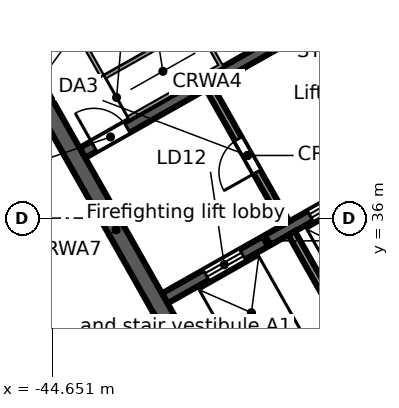
"""IFC4 building model, lengths in metres.
Left out: names, types, materials, properties, quantities, classifications, styles, units other than length and angle.
Written with IfcOpenShell. Run it as: python <this file> out.ifc"""

import sys

from ifc_helpers import new_model, si_unit, direction, frame, frame_2d, origin, place, context, subcontext, project, spatial, rectangle, extrude, element, fill, save


model = new_model("IFC4")
c1 = context("Model", 3, precision=1e-05, world=origin(), true_north=direction((0.0, 1.0)))
c2 = subcontext(c1, "Body", "Model", "MODEL_VIEW")
j1 = project(units=[si_unit("LENGTHUNIT", "METRE"), si_unit("PLANEANGLEUNIT", "RADIAN")], contexts=[c1])
p1 = place(None, origin())
s1 = spatial("IfcSite", under=j1, at=p1, CompositionType="ELEMENT")
p2 = place(p1, origin())
s2 = spatial("IfcBuilding", under=s1, at=p2, CompositionType="ELEMENT")
p3 = place(p2, frame((0.0, 0.0, 207.5)))
s3 = spatial("IfcBuildingStorey", under=s2, at=p3, CompositionType="ELEMENT", Elevation=207.5)
p4 = place(p3, frame((-0.046, 47.974, 0.0), z_axis=(0.0, 0.0, 1.0), x_axis=(-0.870356579543, -0.492421998337, 0.0)))
e1 = element("IfcWall", 1, at=p4, inside=s3, PredefinedType="STANDARD", context=c2, shape_type="SweptSolid", body=[
    extrude(rectangle(XDim=43.754, YDim=0.25, at=frame_2d((21.877, 0.0))), origin(), (0.0, 0.0, 1.0), 3.62),
])
p5 = place(p4, frame((41.061, 0.0, 0.8)))
e2 = element("IfcOpeningElement", 2, at=p5, cuts=e1, PredefinedType="OPENING", context=c2, shape_type="SweptSolid", body=[
    extrude(rectangle(XDim=2.4, YDim=2.2, at=frame_2d((1.2, 1.1))), frame((0.0, 0.135, 0.0), z_axis=(0.0, -1.0, 0.0), x_axis=(1.0, 0.0, 0.0)), (0.0, 0.0, 1.0), 0.27),
])
p6 = place(p4, frame((38.443, 0.0, 0.0)))
e3 = element("IfcOpeningElement", 3, at=p6, cuts=e1, PredefinedType="OPENING", context=c2, shape_type="SweptSolid", body=[
    extrude(rectangle(XDim=1.8, YDim=2.4, at=frame_2d((0.9, 1.2))), frame((0.0, 0.135, 0.0), z_axis=(0.0, -1.0, 0.0), x_axis=(1.0, 0.0, 0.0)), (0.0, 0.0, 1.0), 0.27),
])
p7 = place(p4, frame((35.225, 0.0, 0.8)))
e4 = element("IfcOpeningElement", 4, at=p7, cuts=e1, PredefinedType="OPENING", context=c2, shape_type="SweptSolid", body=[
    extrude(rectangle(XDim=2.4, YDim=2.2, at=frame_2d((1.2, 1.1))), frame((0.0, 0.135, 0.0), z_axis=(0.0, -1.0, 0.0), x_axis=(1.0, 0.0, 0.0)), (0.0, 0.0, 1.0), 0.27),
])
p8 = place(p4, frame((32.307, 0.0, 0.8)))
e5 = element("IfcOpeningElement", 5, at=p8, cuts=e1, PredefinedType="OPENING", context=c2, shape_type="SweptSolid", body=[
    extrude(rectangle(XDim=2.4, YDim=2.2, at=frame_2d((1.2, 1.1))), frame((0.0, 0.135, 0.0), z_axis=(0.0, -1.0, 0.0), x_axis=(1.0, 0.0, 0.0)), (0.0, 0.0, 1.0), 0.27),
])
p9 = place(p4, frame((29.688, 0.0, 0.0)))
e6 = element("IfcOpeningElement", 6, at=p9, cuts=e1, PredefinedType="OPENING", context=c2, shape_type="SweptSolid", body=[
    extrude(rectangle(XDim=1.8, YDim=2.4, at=frame_2d((0.9, 1.2))), frame((0.0, 0.135, 0.0), z_axis=(0.0, -1.0, 0.0), x_axis=(1.0, 0.0, 0.0)), (0.0, 0.0, 1.0), 0.27),
])
p10 = place(p4, frame((26.47, 0.0, 0.8)))
e7 = element("IfcOpeningElement", 7, at=p10, cuts=e1, PredefinedType="OPENING", context=c2, shape_type="SweptSolid", body=[
    extrude(rectangle(XDim=2.4, YDim=2.2, at=frame_2d((1.2, 1.1))), frame((0.0, 0.135, 0.0), z_axis=(0.0, -1.0, 0.0), x_axis=(1.0, 0.0, 0.0)), (0.0, 0.0, 1.0), 0.27),
])
p11 = place(p4, frame((23.552, 0.0, 0.8)))
e8 = element("IfcOpeningElement", 8, at=p11, cuts=e1, PredefinedType="OPENING", context=c2, shape_type="SweptSolid", body=[
    extrude(rectangle(XDim=2.4, YDim=2.2, at=frame_2d((1.2, 1.1))), frame((0.0, 0.135, 0.0), z_axis=(0.0, -1.0, 0.0), x_axis=(1.0, 0.0, 0.0)), (0.0, 0.0, 1.0), 0.27),
])
p12 = place(p4, frame((20.934, 0.0, 0.0)))
e9 = element("IfcOpeningElement", 9, at=p12, cuts=e1, PredefinedType="OPENING", context=c2, shape_type="SweptSolid", body=[
    extrude(rectangle(XDim=1.8, YDim=2.4, at=frame_2d((0.9, 1.2))), frame((0.0, 0.135, 0.0), z_axis=(0.0, -1.0, 0.0), x_axis=(1.0, 0.0, 0.0)), (0.0, 0.0, 1.0), 0.27),
])
p13 = place(p4, frame((17.716, 0.0, 0.8)))
e10 = element("IfcOpeningElement", 10, at=p13, cuts=e1, PredefinedType="OPENING", context=c2, shape_type="SweptSolid", body=[
    extrude(rectangle(XDim=2.4, YDim=2.2, at=frame_2d((1.2, 1.1))), frame((0.0, 0.135, 0.0), z_axis=(0.0, -1.0, 0.0), x_axis=(1.0, 0.0, 0.0)), (0.0, 0.0, 1.0), 0.27),
])
p14 = place(p4, frame((14.798, 0.0, 0.8)))
e11 = element("IfcOpeningElement", 11, at=p14, cuts=e1, PredefinedType="OPENING", context=c2, shape_type="SweptSolid", body=[
    extrude(rectangle(XDim=2.4, YDim=2.2, at=frame_2d((1.2, 1.1))), frame((0.0, 0.135, 0.0), z_axis=(0.0, -1.0, 0.0), x_axis=(1.0, 0.0, 0.0)), (0.0, 0.0, 1.0), 0.27),
])
p15 = place(p4, frame((12.179, 0.0, 0.0)))
e12 = element("IfcOpeningElement", 12, at=p15, cuts=e1, PredefinedType="OPENING", context=c2, shape_type="SweptSolid", body=[
    extrude(rectangle(XDim=1.8, YDim=2.4, at=frame_2d((0.9, 1.2))), frame((0.0, 0.135, 0.0), z_axis=(0.0, -1.0, 0.0), x_axis=(1.0, 0.0, 0.0)), (0.0, 0.0, 1.0), 0.27),
])
p16 = place(p4, frame((8.961, 0.0, 0.8)))
e13 = element("IfcOpeningElement", 13, at=p16, cuts=e1, PredefinedType="OPENING", context=c2, shape_type="SweptSolid", body=[
    extrude(rectangle(XDim=2.4, YDim=2.2, at=frame_2d((1.2, 1.1))), frame((0.0, 0.135, 0.0), z_axis=(0.0, -1.0, 0.0), x_axis=(1.0, 0.0, 0.0)), (0.0, 0.0, 1.0), 0.27),
])
p17 = place(p4, frame((6.043, 0.0, 0.8)))
e14 = element("IfcOpeningElement", 14, at=p17, cuts=e1, PredefinedType="OPENING", context=c2, shape_type="SweptSolid", body=[
    extrude(rectangle(XDim=2.4, YDim=2.2, at=frame_2d((1.2, 1.1))), frame((0.0, 0.135, 0.0), z_axis=(0.0, -1.0, 0.0), x_axis=(1.0, 0.0, 0.0)), (0.0, 0.0, 1.0), 0.27),
])
p18 = place(p4, frame((3.425, 0.0, 0.0)))
e15 = element("IfcOpeningElement", 15, at=p18, cuts=e1, PredefinedType="OPENING", context=c2, shape_type="SweptSolid", body=[
    extrude(rectangle(XDim=1.8, YDim=2.4, at=frame_2d((0.9, 1.2))), frame((0.0, 0.135, 0.0), z_axis=(0.0, -1.0, 0.0), x_axis=(1.0, 0.0, 0.0)), (0.0, 0.0, 1.0), 0.27),
])
p19 = place(p4, frame((0.207, 0.0, 0.8)))
e16 = element("IfcOpeningElement", 16, at=p19, cuts=e1, PredefinedType="OPENING", context=c2, shape_type="SweptSolid", body=[
    extrude(rectangle(XDim=2.4, YDim=2.2, at=frame_2d((1.2, 1.1))), frame((0.0, 0.135, 0.0), z_axis=(0.0, -1.0, 0.0), x_axis=(1.0, 0.0, 0.0)), (0.0, 0.0, 1.0), 0.27),
])
p20 = place(p3, frame((-58.732, 38.771, 0.0), z_axis=(0.0, 0.0, 1.0), x_axis=(0.870354824205, 0.492425100887, 0.0)))
e17 = element("IfcWall", 17, at=p20, inside=s3, PredefinedType="STANDARD", context=c2, shape_type="SweptSolid", body=[
    extrude(rectangle(XDim=64.006, YDim=0.25, at=frame_2d((32.003, 0.0))), origin(), (0.0, 0.0, 1.0), 3.62),
])
p21 = place(p20, frame((61.259, 0.0, 0.8)))
e18 = element("IfcOpeningElement", 18, at=p21, cuts=e17, PredefinedType="OPENING", context=c2, shape_type="SweptSolid", body=[
    extrude(rectangle(XDim=2.4, YDim=2.2, at=frame_2d((1.2, 1.1))), frame((0.0, 0.135, 0.0), z_axis=(0.0, -1.0, 0.0), x_axis=(1.0, 0.0, 0.0)), (0.0, 0.0, 1.0), 0.27),
])
p22 = place(p20, frame((58.216, 0.0, 0.8)))
e19 = element("IfcOpeningElement", 19, at=p22, cuts=e17, PredefinedType="OPENING", context=c2, shape_type="SweptSolid", body=[
    extrude(rectangle(XDim=2.4, YDim=2.2, at=frame_2d((1.2, 1.1))), frame((0.0, 0.135, 0.0), z_axis=(0.0, -1.0, 0.0), x_axis=(1.0, 0.0, 0.0)), (0.0, 0.0, 1.0), 0.27),
])
p23 = place(p20, frame((55.173, 0.0, 0.8)))
e20 = element("IfcOpeningElement", 20, at=p23, cuts=e17, PredefinedType="OPENING", context=c2, shape_type="SweptSolid", body=[
    extrude(rectangle(XDim=2.4, YDim=2.2, at=frame_2d((1.2, 1.1))), frame((0.0, 0.135, 0.0), z_axis=(0.0, -1.0, 0.0), x_axis=(1.0, 0.0, 0.0)), (0.0, 0.0, 1.0), 0.27),
])
p24 = place(p20, frame((52.129, 0.0, 0.8)))
e21 = element("IfcOpeningElement", 21, at=p24, cuts=e17, PredefinedType="OPENING", context=c2, shape_type="SweptSolid", body=[
    extrude(rectangle(XDim=2.4, YDim=2.2, at=frame_2d((1.2, 1.1))), frame((0.0, 0.135, 0.0), z_axis=(0.0, -1.0, 0.0), x_axis=(1.0, 0.0, 0.0)), (0.0, 0.0, 1.0), 0.27),
])
p25 = place(p20, frame((49.086, 0.0, 0.8)))
e22 = element("IfcOpeningElement", 22, at=p25, cuts=e17, PredefinedType="OPENING", context=c2, shape_type="SweptSolid", body=[
    extrude(rectangle(XDim=2.4, YDim=2.2, at=frame_2d((1.2, 1.1))), frame((0.0, 0.135, 0.0), z_axis=(0.0, -1.0, 0.0), x_axis=(1.0, 0.0, 0.0)), (0.0, 0.0, 1.0), 0.27),
])
p26 = place(p20, frame((46.043, 0.0, 0.8)))
e23 = element("IfcOpeningElement", 23, at=p26, cuts=e17, PredefinedType="OPENING", context=c2, shape_type="SweptSolid", body=[
    extrude(rectangle(XDim=2.4, YDim=2.2, at=frame_2d((1.2, 1.1))), frame((0.0, 0.135, 0.0), z_axis=(0.0, -1.0, 0.0), x_axis=(1.0, 0.0, 0.0)), (0.0, 0.0, 1.0), 0.27),
])
p27 = place(p20, frame((43.0, 0.0, 0.8)))
e24 = element("IfcOpeningElement", 24, at=p27, cuts=e17, PredefinedType="OPENING", context=c2, shape_type="SweptSolid", body=[
    extrude(rectangle(XDim=2.4, YDim=2.2, at=frame_2d((1.2, 1.1))), frame((0.0, 0.135, 0.0), z_axis=(0.0, -1.0, 0.0), x_axis=(1.0, 0.0, 0.0)), (0.0, 0.0, 1.0), 0.27),
])
p28 = place(p20, frame((39.956, 0.0, 0.8)))
e25 = element("IfcOpeningElement", 25, at=p28, cuts=e17, PredefinedType="OPENING", context=c2, shape_type="SweptSolid", body=[
    extrude(rectangle(XDim=2.4, YDim=2.2, at=frame_2d((1.2, 1.1))), frame((0.0, 0.135, 0.0), z_axis=(0.0, -1.0, 0.0), x_axis=(1.0, 0.0, 0.0)), (0.0, 0.0, 1.0), 0.27),
])
p29 = place(p20, frame((36.913, 0.0, 0.8)))
e26 = element("IfcOpeningElement", 26, at=p29, cuts=e17, PredefinedType="OPENING", context=c2, shape_type="SweptSolid", body=[
    extrude(rectangle(XDim=2.4, YDim=2.2, at=frame_2d((1.2, 1.1))), frame((0.0, 0.135, 0.0), z_axis=(0.0, -1.0, 0.0), x_axis=(1.0, 0.0, 0.0)), (0.0, 0.0, 1.0), 0.27),
])
p30 = place(p20, frame((33.87, 0.0, 0.8)))
e27 = element("IfcOpeningElement", 27, at=p30, cuts=e17, PredefinedType="OPENING", context=c2, shape_type="SweptSolid", body=[
    extrude(rectangle(XDim=2.4, YDim=2.2, at=frame_2d((1.2, 1.1))), frame((0.0, 0.135, 0.0), z_axis=(0.0, -1.0, 0.0), x_axis=(1.0, 0.0, 0.0)), (0.0, 0.0, 1.0), 0.27),
])
p31 = place(p20, frame((30.826, 0.0, 0.8)))
e28 = element("IfcOpeningElement", 28, at=p31, cuts=e17, PredefinedType="OPENING", context=c2, shape_type="SweptSolid", body=[
    extrude(rectangle(XDim=2.4, YDim=2.2, at=frame_2d((1.2, 1.1))), frame((0.0, 0.135, 0.0), z_axis=(0.0, -1.0, 0.0), x_axis=(1.0, 0.0, 0.0)), (0.0, 0.0, 1.0), 0.27),
])
p32 = place(p20, frame((27.783, 0.0, 0.8)))
e29 = element("IfcOpeningElement", 29, at=p32, cuts=e17, PredefinedType="OPENING", context=c2, shape_type="SweptSolid", body=[
    extrude(rectangle(XDim=2.4, YDim=2.2, at=frame_2d((1.2, 1.1))), frame((0.0, 0.135, 0.0), z_axis=(0.0, -1.0, 0.0), x_axis=(1.0, 0.0, 0.0)), (0.0, 0.0, 1.0), 0.27),
])
p33 = place(p20, frame((24.74, 0.0, 0.8)))
e30 = element("IfcOpeningElement", 30, at=p33, cuts=e17, PredefinedType="OPENING", context=c2, shape_type="SweptSolid", body=[
    extrude(rectangle(XDim=2.4, YDim=2.2, at=frame_2d((1.2, 1.1))), frame((0.0, 0.135, 0.0), z_axis=(0.0, -1.0, 0.0), x_axis=(1.0, 0.0, 0.0)), (0.0, 0.0, 1.0), 0.27),
])
p34 = place(p20, frame((21.696, 0.0, 0.8)))
e31 = element("IfcOpeningElement", 31, at=p34, cuts=e17, PredefinedType="OPENING", context=c2, shape_type="SweptSolid", body=[
    extrude(rectangle(XDim=2.4, YDim=2.2, at=frame_2d((1.2, 1.1))), frame((0.0, 0.135, 0.0), z_axis=(0.0, -1.0, 0.0), x_axis=(1.0, 0.0, 0.0)), (0.0, 0.0, 1.0), 0.27),
])
p35 = place(p20, frame((18.653, 0.0, 0.8)))
e32 = element("IfcOpeningElement", 32, at=p35, cuts=e17, PredefinedType="OPENING", context=c2, shape_type="SweptSolid", body=[
    extrude(rectangle(XDim=2.4, YDim=2.2, at=frame_2d((1.2, 1.1))), frame((0.0, 0.135, 0.0), z_axis=(0.0, -1.0, 0.0), x_axis=(1.0, 0.0, 0.0)), (0.0, 0.0, 1.0), 0.27),
])
p36 = place(p20, frame((15.61, 0.0, 0.8)))
e33 = element("IfcOpeningElement", 33, at=p36, cuts=e17, PredefinedType="OPENING", context=c2, shape_type="SweptSolid", body=[
    extrude(rectangle(XDim=2.4, YDim=2.2, at=frame_2d((1.2, 1.1))), frame((0.0, 0.135, 0.0), z_axis=(0.0, -1.0, 0.0), x_axis=(1.0, 0.0, 0.0)), (0.0, 0.0, 1.0), 0.27),
])
p37 = place(p20, frame((12.567, 0.0, 0.8)))
e34 = element("IfcOpeningElement", 34, at=p37, cuts=e17, PredefinedType="OPENING", context=c2, shape_type="SweptSolid", body=[
    extrude(rectangle(XDim=2.4, YDim=2.2, at=frame_2d((1.2, 1.1))), frame((0.0, 0.135, 0.0), z_axis=(0.0, -1.0, 0.0), x_axis=(1.0, 0.0, 0.0)), (0.0, 0.0, 1.0), 0.27),
])
p38 = place(p20, frame((9.523, 0.0, 0.8)))
e35 = element("IfcOpeningElement", 35, at=p38, cuts=e17, PredefinedType="OPENING", context=c2, shape_type="SweptSolid", body=[
    extrude(rectangle(XDim=2.4, YDim=2.2, at=frame_2d((1.2, 1.1))), frame((0.0, 0.135, 0.0), z_axis=(0.0, -1.0, 0.0), x_axis=(1.0, 0.0, 0.0)), (0.0, 0.0, 1.0), 0.27),
])
p39 = place(p20, frame((6.48, 0.0, 0.8)))
e36 = element("IfcOpeningElement", 36, at=p39, cuts=e17, PredefinedType="OPENING", context=c2, shape_type="SweptSolid", body=[
    extrude(rectangle(XDim=2.4, YDim=2.2, at=frame_2d((1.2, 1.1))), frame((0.0, 0.135, 0.0), z_axis=(0.0, -1.0, 0.0), x_axis=(1.0, 0.0, 0.0)), (0.0, 0.0, 1.0), 0.27),
])
p40 = place(p20, frame((3.437, 0.0, 0.8)))
e37 = element("IfcOpeningElement", 37, at=p40, cuts=e17, PredefinedType="OPENING", context=c2, shape_type="SweptSolid", body=[
    extrude(rectangle(XDim=2.4, YDim=2.2, at=frame_2d((1.2, 1.1))), frame((0.0, 0.135, 0.0), z_axis=(0.0, -1.0, 0.0), x_axis=(1.0, 0.0, 0.0)), (0.0, 0.0, 1.0), 0.27),
])
p41 = place(p20, frame((0.393, 0.0, 0.8)))
e38 = element("IfcOpeningElement", 38, at=p41, cuts=e17, PredefinedType="OPENING", context=c2, shape_type="SweptSolid", body=[
    extrude(rectangle(XDim=2.4, YDim=2.2, at=frame_2d((1.2, 1.1))), frame((0.0, 0.135, 0.0), z_axis=(0.0, -1.0, 0.0), x_axis=(1.0, 0.0, 0.0)), (0.0, 0.0, 1.0), 0.27),
])
p42 = place(p3, frame((-44.115, 26.507, 0.0), z_axis=(0.0, 0.0, 1.0), x_axis=(-0.857166583633, 0.515039268311, 0.0)))
e39 = element("IfcWall", 39, at=p42, inside=s3, PredefinedType="STANDARD", context=c2, shape_type="SweptSolid", body=[
    extrude(rectangle(XDim=17.106, YDim=0.25, at=frame_2d((8.553, 0.0))), origin(), (0.0, 0.0, 1.0), 3.62),
])
p43 = place(p42, frame((14.417, 0.0, 0.8)))
e40 = element("IfcOpeningElement", 40, at=p43, cuts=e39, PredefinedType="OPENING", context=c2, shape_type="SweptSolid", body=[
    extrude(rectangle(XDim=2.4, YDim=2.2, at=frame_2d((1.2, 1.1))), frame((0.0, 0.135, 0.0), z_axis=(0.0, -1.0, 0.0), x_axis=(1.0, 0.0, 0.0)), (0.0, 0.0, 1.0), 0.27),
])
p44 = place(p42, frame((11.584, 0.0, 0.8)))
e41 = element("IfcOpeningElement", 41, at=p44, cuts=e39, PredefinedType="OPENING", context=c2, shape_type="SweptSolid", body=[
    extrude(rectangle(XDim=2.4, YDim=2.2, at=frame_2d((1.2, 1.1))), frame((0.0, 0.135, 0.0), z_axis=(0.0, -1.0, 0.0), x_axis=(1.0, 0.0, 0.0)), (0.0, 0.0, 1.0), 0.27),
])
p45 = place(p42, frame((8.75, 0.0, 0.8)))
e42 = element("IfcOpeningElement", 42, at=p45, cuts=e39, PredefinedType="OPENING", context=c2, shape_type="SweptSolid", body=[
    extrude(rectangle(XDim=2.4, YDim=2.2, at=frame_2d((1.2, 1.1))), frame((0.0, 0.135, 0.0), z_axis=(0.0, -1.0, 0.0), x_axis=(1.0, 0.0, 0.0)), (0.0, 0.0, 1.0), 0.27),
])
p46 = place(p42, frame((5.917, 0.0, 0.8)))
e43 = element("IfcOpeningElement", 43, at=p46, cuts=e39, PredefinedType="OPENING", context=c2, shape_type="SweptSolid", body=[
    extrude(rectangle(XDim=2.4, YDim=2.2, at=frame_2d((1.2, 1.1))), frame((0.0, 0.135, 0.0), z_axis=(0.0, -1.0, 0.0), x_axis=(1.0, 0.0, 0.0)), (0.0, 0.0, 1.0), 0.27),
])
p47 = place(p42, frame((3.084, 0.0, 0.8)))
e44 = element("IfcOpeningElement", 44, at=p47, cuts=e39, PredefinedType="OPENING", context=c2, shape_type="SweptSolid", body=[
    extrude(rectangle(XDim=2.4, YDim=2.2, at=frame_2d((1.2, 1.1))), frame((0.0, 0.135, 0.0), z_axis=(0.0, -1.0, 0.0), x_axis=(1.0, 0.0, 0.0)), (0.0, 0.0, 1.0), 0.27),
])
p48 = place(p42, frame((0.25, 0.0, 0.8)))
e45 = element("IfcOpeningElement", 45, at=p48, cuts=e39, PredefinedType="OPENING", context=c2, shape_type="SweptSolid", body=[
    extrude(rectangle(XDim=2.4, YDim=2.2, at=frame_2d((1.2, 1.1))), frame((0.0, 0.135, 0.0), z_axis=(0.0, -1.0, 0.0), x_axis=(1.0, 0.0, 0.0)), (0.0, 0.0, 1.0), 0.27),
])
p49 = place(p3, frame((-39.825, 29.684, 0.0), z_axis=(0.0, 0.0, 1.0), x_axis=(0.870353598469, 0.492427267353, 0.0)))
e46 = element("IfcWall", 46, at=p49, inside=s3, PredefinedType="SOLIDWALL", context=c2, shape_type="SweptSolid", body=[
    extrude(rectangle(XDim=17.0, YDim=0.45, at=frame_2d((8.5, 0.0))), origin(), (0.0, 0.0, 1.0), 3.62),
])
p50 = place(p49, frame((7.2, 0.0, 0.0)))
e47 = element("IfcOpeningElement", 47, at=p50, cuts=e46, PredefinedType="OPENING", context=c2, shape_type="SweptSolid", body=[
    extrude(rectangle(XDim=1.2, YDim=2.1, at=frame_2d((0.6, 1.05))), frame((0.0, 0.235, 0.0), z_axis=(0.0, -1.0, 0.0), x_axis=(1.0, 0.0, 0.0)), (0.0, 0.0, 1.0), 0.47),
])
p51 = place(p3, frame((-41.687, 33.887, 0.0), z_axis=(0.0, 0.0, 1.0), x_axis=(0.870355736587, 0.49242348826, 0.0)))
e48 = element("IfcWall", 48, at=p51, inside=s3, PredefinedType="SOLIDWALL", context=c2, shape_type="SweptSolid", body=[
    extrude(rectangle(XDim=6.15, YDim=0.3, at=frame_2d((3.075, 0.0))), origin(), (0.0, 0.0, 1.0), 3.62),
])
p52 = place(p51, frame((1.25, 0.0, 0.0)))
e49 = element("IfcOpeningElement", 49, at=p52, cuts=e48, PredefinedType="OPENING", context=c2, shape_type="SweptSolid", body=[
    extrude(rectangle(XDim=1.1, YDim=2.1, at=frame_2d((0.55, 1.05))), frame((0.0, 0.16, 0.0), z_axis=(0.0, -1.0, 0.0), x_axis=(1.0, 0.0, 0.0)), (0.0, 0.0, 1.0), 0.32),
])
p53 = place(p51, frame((4.4, 0.0, 0.0)))
e50 = element("IfcOpeningElement", 50, at=p53, cuts=e48, PredefinedType="OPENING", context=c2, shape_type="SweptSolid", body=[
    extrude(rectangle(XDim=1.1, YDim=2.1, at=frame_2d((0.55, 1.05))), frame((0.0, 0.16, 0.0), z_axis=(0.0, -1.0, 0.0), x_axis=(1.0, 0.0, 0.0)), (0.0, 0.0, 1.0), 0.32),
])
p54 = place(p3, frame((-43.853, 37.717, 0.0), z_axis=(0.0, 0.0, 1.0), x_axis=(0.870360409231, 0.492415229297, 0.0)))
e51 = element("IfcWall", 51, at=p54, inside=s3, PredefinedType="SOLIDWALL", context=c2, shape_type="SweptSolid", body=[
    extrude(rectangle(XDim=7.55, YDim=0.3, at=frame_2d((3.775, 0.0))), origin(), (0.0, 0.0, 1.0), 3.62),
])
p55 = place(p54, frame((0.35, 0.0, 0.0)))
e52 = element("IfcOpeningElement", 52, at=p55, cuts=e51, PredefinedType="OPENING", context=c2, shape_type="SweptSolid", body=[
    extrude(rectangle(XDim=1.0, YDim=2.1, at=frame_2d((0.5, 1.05))), frame((0.0, 0.16, 0.0), z_axis=(0.0, -1.0, 0.0), x_axis=(1.0, 0.0, 0.0)), (0.0, 0.0, 1.0), 0.32),
])
p56 = place(p3, frame((-46.191, 41.392, 0.0), z_axis=(0.0, 0.0, 1.0), x_axis=(0.492421378713, -0.870356930107, 0.0)))
e53 = element("IfcWall", 53, at=p56, inside=s3, PredefinedType="SOLIDWALL", context=c2, shape_type="SweptSolid", body=[
    extrude(rectangle(XDim=13.1, YDim=0.45, at=frame_2d((6.55, 0.0))), origin(), (0.0, 0.0, 1.0), 3.62),
])
p57 = place(p3, frame((-38.349, 35.603, 0.0), z_axis=(0.0, 0.0, 1.0), x_axis=(0.492409653846, -0.870363563575, 0.0)))
e54 = element("IfcWall", 54, at=p57, inside=s3, PredefinedType="SOLIDWALL", context=c2, shape_type="SweptSolid", body=[
    extrude(rectangle(XDim=4.2, YDim=0.2, at=frame_2d((2.1, 0.0))), origin(), (0.0, 0.0, 1.0), 3.62),
])
p58 = place(p3, frame((-40.516, 39.433, 0.0), z_axis=(0.0, 0.0, 1.0), x_axis=(0.492453559952, -0.87033872216, 0.0)))
e55 = element("IfcWall", 55, at=p58, inside=s3, PredefinedType="PARTITIONING", context=c2, shape_type="SweptSolid", body=[
    extrude(rectangle(XDim=4.1, YDim=0.2, at=frame_2d((2.05, 0.0))), origin(), (0.0, 0.0, 1.0), 3.62),
])
p59 = place(p58, frame((1.55, 0.0, 0.0)))
e56 = element("IfcOpeningElement", 56, at=p59, cuts=e55, PredefinedType="OPENING", context=c2, shape_type="SweptSolid", body=[
    extrude(rectangle(XDim=1.0, YDim=2.1, at=frame_2d((0.5, 1.05))), frame((0.0, 0.11, 0.0), z_axis=(0.0, -1.0, 0.0), x_axis=(1.0, 0.0, 0.0)), (0.0, 0.0, 1.0), 0.22),
])
p60 = place(p3, frame((-48.843, 29.494, 0.0), z_axis=(0.0, 0.0, 1.0), x_axis=(0.870384139606, 0.492373282705, 0.0)))
e57 = element("IfcWall", 57, at=p60, inside=s3, PredefinedType="PARTITIONING", context=c2, shape_type="SweptSolid", body=[
    extrude(rectangle(XDim=7.941, YDim=0.125, at=frame_2d((3.971, 0.0))), origin(), (0.0, 0.0, 1.0), 2.9),
])
p61 = place(p60, frame((3.45, 0.0, 0.0)))
e58 = element("IfcOpeningElement", 58, at=p61, cuts=e57, PredefinedType="OPENING", context=c2, shape_type="SweptSolid", body=[
    extrude(rectangle(XDim=0.9, YDim=2.1, at=frame_2d((0.45, 1.05))), frame((0.0, 0.073, 0.0), z_axis=(0.0, -1.0, 0.0), x_axis=(1.0, 0.0, 0.0)), (0.0, 0.0, 1.0), 0.145),
])
p62 = place(p52, origin())
e59 = element("IfcDoor", 59, at=p62, inside=s3, OperationType="DOUBLE_DOOR_SLIDING", PredefinedType="DOOR", context=c2, shape_type="SweptSolid", body=[
    extrude(rectangle(XDim=1.1, YDim=2.1, at=frame_2d((0.55, 1.05))), frame((0.0, 0.025, 0.0), z_axis=(0.0, -1.0, 0.0), x_axis=(1.0, 0.0, 0.0)), (0.0, 0.0, 1.0), 0.05),
])
fill(e49, e59)
p63 = place(p53, origin())
e60 = element("IfcDoor", 60, at=p63, inside=s3, OperationType="DOUBLE_DOOR_SLIDING", PredefinedType="DOOR", context=c2, shape_type="SweptSolid", body=[
    extrude(rectangle(XDim=1.1, YDim=2.1, at=frame_2d((0.55, 1.05))), frame((0.0, 0.025, 0.0), z_axis=(0.0, -1.0, 0.0), x_axis=(1.0, 0.0, 0.0)), (0.0, 0.0, 1.0), 0.05),
])
fill(e50, e60)
p64 = place(p55, origin())
e61 = element("IfcDoor", 61, at=p64, inside=s3, OperationType="SINGLE_SWING_LEFT", PredefinedType="DOOR", context=c2, shape_type="SweptSolid", body=[
    extrude(rectangle(XDim=1.0, YDim=2.1, at=frame_2d((0.5, 1.05))), frame((0.0, 0.025, 0.0), z_axis=(0.0, -1.0, 0.0), x_axis=(1.0, 0.0, 0.0)), (0.0, 0.0, 1.0), 0.05),
])
fill(e52, e61)
p65 = place(p59, frame((1.0, 0.0, 0.0), z_axis=(0.0, 0.0, 1.0), x_axis=(-1.0, 0.0, 0.0)))
e62 = element("IfcDoor", 62, at=p65, inside=s3, OperationType="SINGLE_SWING_LEFT", PredefinedType="DOOR", context=c2, shape_type="SweptSolid", body=[
    extrude(rectangle(XDim=1.0, YDim=2.1, at=frame_2d((0.5, 1.05))), frame((0.0, 0.025, 0.0), z_axis=(0.0, -1.0, 0.0), x_axis=(1.0, 0.0, 0.0)), (0.0, 0.0, 1.0), 0.05),
])
fill(e56, e62)
save(model, sys.argv[1])
